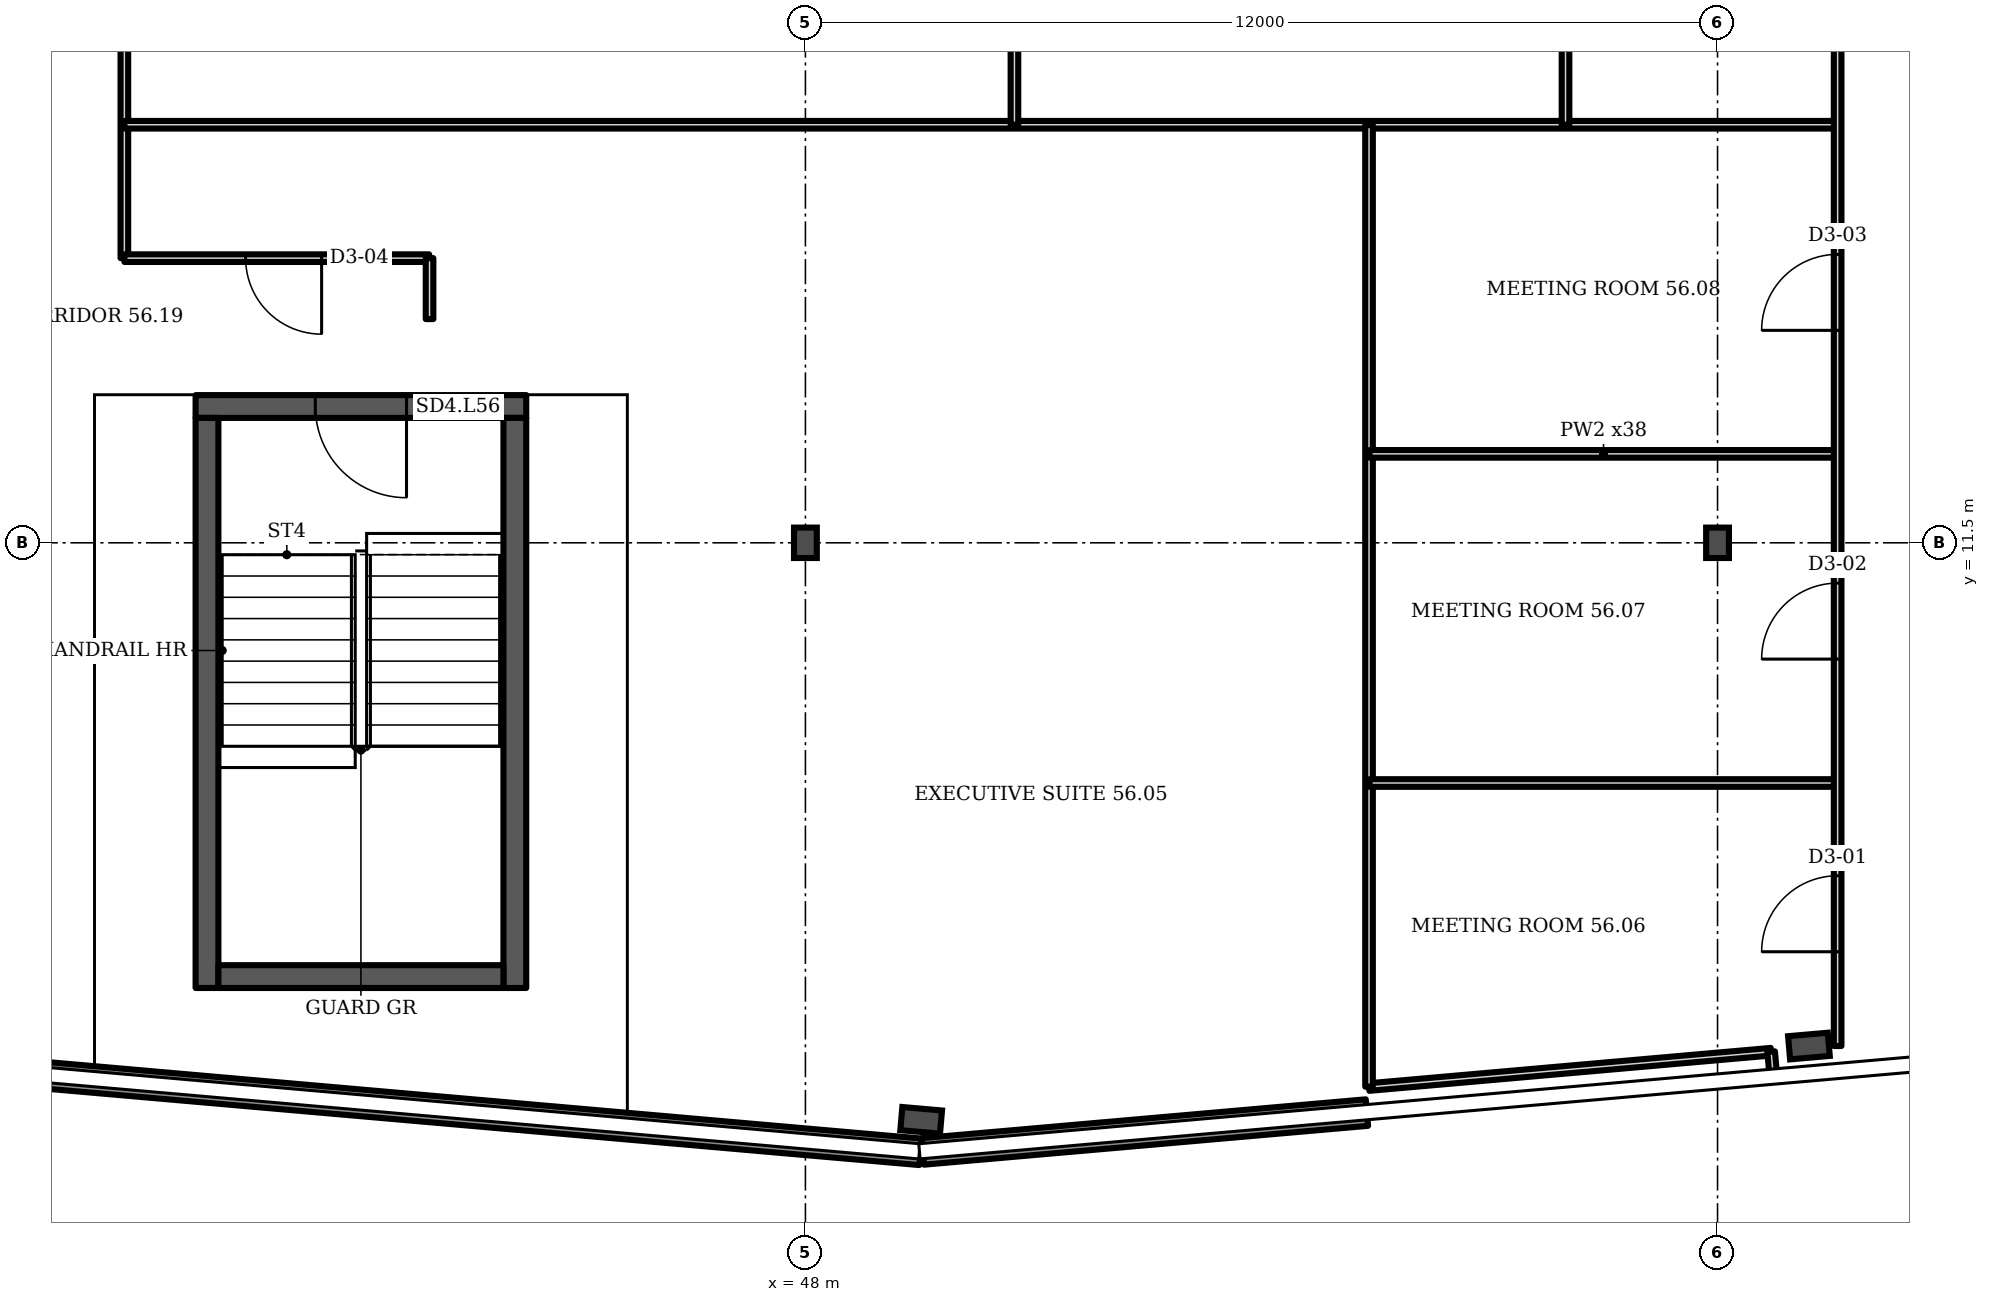
"""IFC4 building model, lengths in metres.
Left out: names, types, materials, properties, quantities, classifications, styles, units other than length and angle.
Written with IfcOpenShell. Run it as: python <this file> out.ifc"""

import sys

from ifc_helpers import new_model, si_unit, direction, frame, frame_2d, origin, origin_2d, place, context, subcontext, project, spatial, rectangle, i_section, extrude, element, fill, save


model = new_model("IFC4")
c1 = context("Model", 3, precision=1e-05, world=origin(), true_north=direction((0.0, 1.0)))
c2 = subcontext(c1, "Body", "Model", "MODEL_VIEW")
j1 = project(units=[si_unit("LENGTHUNIT", "METRE"), si_unit("PLANEANGLEUNIT", "RADIAN")], contexts=[c1])
p1 = place(None, origin())
s1 = spatial("IfcSite", under=j1, at=p1, CompositionType="ELEMENT")
p2 = place(p1, origin())
s2 = spatial("IfcBuilding", under=s1, at=p2, CompositionType="ELEMENT")
p3 = place(p2, frame((0.0, 0.0, 225.1)))
s3 = spatial("IfcBuildingStorey", under=s2, at=p3, CompositionType="ELEMENT", Elevation=225.1)
for number, where, z_axis, x_axis in (
    (1, (49.523, 3.902, 0.0), (0.0, 0.0, 1.0), (-0.087, -0.996, 0.0)),
    (2, (61.202, 4.879, 0.0), (0.0, 0.0, 1.0), (0.087, -0.996, 0.0)),
):
    element("IfcColumn", number, at=place(p3, frame(where, z_axis=z_axis, x_axis=x_axis)), inside=s3, PredefinedType="COLUMN", context=c2, shape_type="SweptSolid", body=[
        extrude(i_section(OverallWidth=0.306, OverallDepth=0.524, WebThickness=0.021, FlangeThickness=0.04, FilletRadius=0.027, at=origin_2d()), origin(), (0.0, 0.0, 1.0), 3.6),
    ])
for number, where, z_axis, x_axis in (
    (3, (48.0, 11.5, 0.0), (0.0, 0.0, 1.0), (1.0, 0.0, 0.0)),
    (4, (60.0, 11.5, 0.0), (0.0, 0.0, 1.0), (1.0, 0.0, 0.0)),
):
    element("IfcColumn", number, at=place(p3, frame(where, z_axis=z_axis, x_axis=x_axis)), inside=s3, PredefinedType="COLUMN", context=c2, shape_type="SweptSolid", body=[
        extrude(i_section(OverallWidth=0.3, OverallDepth=0.4, WebThickness=0.013, FlangeThickness=0.024, FilletRadius=0.027, at=origin_2d()), origin(), (0.0, 0.0, 1.0), 3.6),
    ])
p4 = place(p3, frame((37.729, 4.519, 0.0), z_axis=(0.0, 0.0, 1.0), x_axis=(0.99619, -0.087167, 0.0)))
e5 = element("IfcWall", 5, at=p4, inside=s3, PredefinedType="SOLIDWALL", context=c2, shape_type="SweptSolid", body=[
    extrude(rectangle(XDim=11.831, YDim=0.35, at=frame_2d((5.915, 0.0))), origin(), (0.0, 0.0, 1.0), 1.0),
])
p5 = place(p3, frame((49.545, 3.493, 0.0), z_axis=(0.0, 0.0, 1.0), x_axis=(0.996196, 0.087138, 0.0)))
e6 = element("IfcWall", 6, at=p5, inside=s3, PredefinedType="SOLIDWALL", context=c2, shape_type="SweptSolid", body=[
    extrude(rectangle(XDim=5.864, YDim=0.35, at=frame_2d((2.932, 0.0))), origin(), (0.0, 0.0, 1.0), 1.0),
])
p6 = place(p3, frame((39.977, 13.293, 0.0), z_axis=(0.0, 0.0, 1.0), x_axis=(1.0, 0.0, 0.0)))
e7 = element("IfcWall", 7, at=p6, inside=s3, PredefinedType="SHEAR", context=c2, shape_type="SweptSolid", body=[
    extrude(rectangle(XDim=4.35, YDim=0.3, at=frame_2d((2.175, 0.0))), origin(), (0.0, 0.0, 1.0), 3.2),
])
p7 = place(p6, frame((1.575, 0.0, 0.0)))
e8 = element("IfcOpeningElement", 8, at=p7, cuts=e7, PredefinedType="OPENING", context=c2, shape_type="SweptSolid", body=[
    extrude(rectangle(XDim=1.2, YDim=2.1, at=frame_2d((0.6, 1.05))), frame((0.0, 0.16, 0.0), z_axis=(0.0, -1.0, 0.0), x_axis=(1.0, 0.0, 0.0)), (0.0, 0.0, 1.0), 0.32),
])
p8 = place(p3, frame((39.04, 15.245, 0.0), z_axis=(0.0, 0.0, 1.0), x_axis=(0.0, 1.0, 0.0)))
e9 = element("IfcWall", 9, at=p8, inside=s3, PredefinedType="PARTITIONING", context=c2, shape_type="SweptSolid", body=[
    extrude(rectangle(XDim=15.255, YDim=0.1, at=frame_2d((7.627, 0.0))), origin(), (0.0, 0.0, 1.0), 3.2),
])
p9 = place(p8, frame((3.575, 0.0, 0.0)))
e10 = element("IfcOpeningElement", 10, at=p9, cuts=e9, PredefinedType="OPENING", context=c2, shape_type="SweptSolid", body=[
    extrude(rectangle(XDim=1.0, YDim=2.1, at=frame_2d((0.5, 1.05))), frame((0.0, 0.06, 0.0), z_axis=(0.0, -1.0, 0.0), x_axis=(1.0, 0.0, 0.0)), (0.0, 0.0, 1.0), 0.12),
])
p10 = place(p8, frame((8.075, 0.0, 0.0)))
e11 = element("IfcOpeningElement", 11, at=p10, cuts=e9, PredefinedType="OPENING", context=c2, shape_type="SweptSolid", body=[
    extrude(rectangle(XDim=1.0, YDim=2.1, at=frame_2d((0.5, 1.05))), frame((0.0, 0.06, 0.0), z_axis=(0.0, -1.0, 0.0), x_axis=(1.0, 0.0, 0.0)), (0.0, 0.0, 1.0), 0.12),
])
p11 = place(p3, frame((39.04, 15.245, 0.0), z_axis=(0.0, 0.0, 1.0), x_axis=(1.0, 0.0, 0.0)))
e12 = element("IfcWall", 12, at=p11, inside=s3, PredefinedType="PARTITIONING", context=c2, shape_type="SweptSolid", body=[
    extrude(rectangle(XDim=4.01, YDim=0.1, at=frame_2d((2.005, 0.0))), origin(), (0.0, 0.0, 1.0), 3.2),
])
p12 = place(p11, frame((1.595, 0.0, 0.0)))
e13 = element("IfcOpeningElement", 13, at=p12, cuts=e12, PredefinedType="OPENING", context=c2, shape_type="SweptSolid", body=[
    extrude(rectangle(XDim=1.0, YDim=2.1, at=frame_2d((0.5, 1.05))), frame((0.0, 0.06, 0.0), z_axis=(0.0, -1.0, 0.0), x_axis=(1.0, 0.0, 0.0)), (0.0, 0.0, 1.0), 0.12),
])
p13 = place(p3, frame((39.04, 17.0, 0.0), z_axis=(0.0, 0.0, 1.0), x_axis=(1.0, 0.0, 0.0)))
e14 = element("IfcWall", 14, at=p13, inside=s3, PredefinedType="PARTITIONING", context=c2, shape_type="SweptSolid", body=[
    extrude(rectangle(XDim=22.54, YDim=0.1, at=frame_2d((11.27, 0.0))), origin(), (0.0, 0.0, 1.0), 3.2),
])
p14 = place(p3, frame((43.055, 14.443, 0.0), z_axis=(0.0, 0.0, 1.0), x_axis=(0.0, 1.0, 0.0)))
e15 = element("IfcWall", 15, at=p14, inside=s3, PredefinedType="PARTITIONING", context=c2, shape_type="SweptSolid", body=[
    extrude(rectangle(XDim=0.802, YDim=0.1, at=frame_2d((0.401, 0.0))), origin(), (0.0, 0.0, 1.0), 3.2),
])
p15 = place(p3, frame((50.75, 17.0, 0.0), z_axis=(0.0, 0.0, 1.0), x_axis=(0.0, 1.0, 0.0)))
e16 = element("IfcWall", 16, at=p15, inside=s3, PredefinedType="PARTITIONING", context=c2, shape_type="SweptSolid", body=[
    extrude(rectangle(XDim=9.0, YDim=0.1, at=frame_2d((4.5, 0.0))), origin(), (0.0, 0.0, 1.0), 3.2),
])
p16 = place(p3, frame((55.415, 4.34, 0.0), z_axis=(0.0, 0.0, 1.0), x_axis=(0.996159, 0.087534, 0.0)))
e17 = element("IfcWall", 17, at=p16, inside=s3, PredefinedType="PARTITIONING", context=c2, shape_type="SweptSolid", body=[
    extrude(rectangle(XDim=5.31, YDim=0.1, at=frame_2d((2.655, 0.0))), origin(), (0.0, 0.0, 1.0), 2.58),
])
p17 = place(p3, frame((55.415, 4.345, 0.0), z_axis=(0.0, 0.0, 1.0), x_axis=(0.0, 1.0, 0.0)))
e18 = element("IfcWall", 18, at=p17, inside=s3, PredefinedType="PARTITIONING", context=c2, shape_type="SweptSolid", body=[
    extrude(rectangle(XDim=12.65, YDim=0.1, at=frame_2d((6.325, 0.0))), origin(), (0.0, 0.0, 1.0), 3.2),
])
for number, where, z_axis, x_axis in (
    (19, (55.42, 8.34, 0.0), (0.0, 0.0, 1.0), (1.0, 0.0, 0.0)),
    (20, (55.42, 12.67, 0.0), (0.0, 0.0, 1.0), (1.0, 0.0, 0.0)),
):
    element("IfcWall", number, at=place(p3, frame(where, z_axis=z_axis, x_axis=x_axis)), inside=s3, PredefinedType="PARTITIONING", context=c2, shape_type="SweptSolid", body=[
        extrude(rectangle(XDim=6.16, YDim=0.1, at=frame_2d((3.08, 0.0))), origin(), (0.0, 0.0, 1.0), 3.2),
    ])
p18 = place(p3, frame((58.0, 17.0, 0.0), z_axis=(0.0, 0.0, 1.0), x_axis=(0.0, 1.0, 0.0)))
e21 = element("IfcWall", 21, at=p18, inside=s3, PredefinedType="PARTITIONING", context=c2, shape_type="SweptSolid", body=[
    extrude(rectangle(XDim=13.5, YDim=0.1, at=frame_2d((6.75, 0.0))), origin(), (0.0, 0.0, 1.0), 3.2),
])
p19 = place(p3, frame((60.733, 4.497, 0.0), z_axis=(0.0, 0.0, 1.0), x_axis=(-0.090037, 0.995936, 0.0)))
e22 = element("IfcWall", 22, at=p19, inside=s3, PredefinedType="PARTITIONING", context=c2, shape_type="SweptSolid", body=[
    extrude(rectangle(XDim=0.309, YDim=0.1, at=frame_2d((0.155, 0.0))), origin(), (0.0, 0.0, 1.0), 3.2),
])
p20 = place(p3, frame((61.58, 4.88, 0.0), z_axis=(0.0, 0.0, 1.0), x_axis=(0.0, 1.0, 0.0)))
e23 = element("IfcWall", 23, at=p20, inside=s3, PredefinedType="PARTITIONING", context=c2, shape_type="SweptSolid", body=[
    extrude(rectangle(XDim=24.82, YDim=0.1, at=frame_2d((12.41, 0.0))), origin(), (0.0, 0.0, 1.0), 3.2),
])
p21 = place(p20, frame((1.24, 0.0, 0.0)))
e24 = element("IfcOpeningElement", 24, at=p21, cuts=e23, PredefinedType="OPENING", context=c2, shape_type="SweptSolid", body=[
    extrude(rectangle(XDim=1.0, YDim=2.1, at=frame_2d((0.5, 1.05))), frame((0.0, 0.06, 0.0), z_axis=(0.0, -1.0, 0.0), x_axis=(1.0, 0.0, 0.0)), (0.0, 0.0, 1.0), 0.12),
])
p22 = place(p20, frame((5.09, 0.0, 0.0)))
e25 = element("IfcOpeningElement", 25, at=p22, cuts=e23, PredefinedType="OPENING", context=c2, shape_type="SweptSolid", body=[
    extrude(rectangle(XDim=1.0, YDim=2.1, at=frame_2d((0.5, 1.05))), frame((0.0, 0.06, 0.0), z_axis=(0.0, -1.0, 0.0), x_axis=(1.0, 0.0, 0.0)), (0.0, 0.0, 1.0), 0.12),
])
p23 = place(p20, frame((9.415, 0.0, 0.0)))
e26 = element("IfcOpeningElement", 26, at=p23, cuts=e23, PredefinedType="OPENING", context=c2, shape_type="SweptSolid", body=[
    extrude(rectangle(XDim=1.0, YDim=2.1, at=frame_2d((0.5, 1.05))), frame((0.0, 0.06, 0.0), z_axis=(0.0, -1.0, 0.0), x_axis=(1.0, 0.0, 0.0)), (0.0, 0.0, 1.0), 0.12),
])
p24 = place(p20, frame((14.85, 0.0, 0.0)))
e27 = element("IfcOpeningElement", 27, at=p24, cuts=e23, PredefinedType="OPENING", context=c2, shape_type="SweptSolid", body=[
    extrude(rectangle(XDim=1.0, YDim=2.1, at=frame_2d((0.5, 1.05))), frame((0.0, 0.06, 0.0), z_axis=(0.0, -1.0, 0.0), x_axis=(1.0, 0.0, 0.0)), (0.0, 0.0, 1.0), 0.12),
])
p25 = place(p20, frame((22.63, 0.0, 0.0)))
e28 = element("IfcOpeningElement", 28, at=p25, cuts=e23, PredefinedType="OPENING", context=c2, shape_type="SweptSolid", body=[
    extrude(rectangle(XDim=1.0, YDim=2.1, at=frame_2d((0.5, 1.05))), frame((0.0, 0.06, 0.0), z_axis=(0.0, -1.0, 0.0), x_axis=(1.0, 0.0, 0.0)), (0.0, 0.0, 1.0), 0.12),
])
for number, where, z_axis, x_axis in (
    (29, (40.127, 5.643, 0.0), (0.0, 0.0, 1.0), (0.0, 1.0, 0.0)),
    (30, (44.177, 5.643, 0.0), (0.0, 0.0, 1.0), (0.0, 1.0, 0.0)),
):
    element("IfcWall", number, at=place(p3, frame(where, z_axis=z_axis, x_axis=x_axis)), inside=s3, PredefinedType="SHEAR", context=c2, shape_type="SweptSolid", body=[
        extrude(rectangle(XDim=7.5, YDim=0.3, at=frame_2d((3.75, 0.0))), origin(), (0.0, 0.0, 1.0), 3.2),
    ])
p26 = place(p3, frame((40.277, 5.793, 0.0), z_axis=(0.0, 0.0, 1.0), x_axis=(1.0, 0.0, 0.0)))
e31 = element("IfcWall", 31, at=p26, inside=s3, PredefinedType="SHEAR", context=c2, shape_type="SweptSolid", body=[
    extrude(rectangle(XDim=3.75, YDim=0.3, at=frame_2d((1.875, 0.0))), origin(), (0.0, 0.0, 1.0), 3.2),
])
p27 = place(p7, origin())
e32 = element("IfcDoor", 32, at=p27, inside=s3, OperationType="SINGLE_SWING_RIGHT", PredefinedType="DOOR", context=c2, shape_type="SweptSolid", body=[
    extrude(rectangle(XDim=1.2, YDim=2.1, at=frame_2d((0.6, 1.05))), frame((0.0, 0.025, 0.0), z_axis=(0.0, -1.0, 0.0), x_axis=(1.0, 0.0, 0.0)), (0.0, 0.0, 1.0), 0.05),
])
fill(e8, e32)
p28 = place(p21, origin())
e33 = element("IfcDoor", 33, at=p28, inside=s3, OperationType="SINGLE_SWING_LEFT", PredefinedType="DOOR", context=c2, shape_type="SweptSolid", body=[
    extrude(rectangle(XDim=1.0, YDim=2.1, at=frame_2d((0.5, 1.05))), frame((0.0, 0.025, 0.0), z_axis=(0.0, -1.0, 0.0), x_axis=(1.0, 0.0, 0.0)), (0.0, 0.0, 1.0), 0.05),
])
fill(e24, e33)
p29 = place(p22, origin())
e34 = element("IfcDoor", 34, at=p29, inside=s3, OperationType="SINGLE_SWING_LEFT", PredefinedType="DOOR", context=c2, shape_type="SweptSolid", body=[
    extrude(rectangle(XDim=1.0, YDim=2.1, at=frame_2d((0.5, 1.05))), frame((0.0, 0.025, 0.0), z_axis=(0.0, -1.0, 0.0), x_axis=(1.0, 0.0, 0.0)), (0.0, 0.0, 1.0), 0.05),
])
fill(e25, e34)
p30 = place(p23, origin())
e35 = element("IfcDoor", 35, at=p30, inside=s3, OperationType="SINGLE_SWING_LEFT", PredefinedType="DOOR", context=c2, shape_type="SweptSolid", body=[
    extrude(rectangle(XDim=1.0, YDim=2.1, at=frame_2d((0.5, 1.05))), frame((0.0, 0.025, 0.0), z_axis=(0.0, -1.0, 0.0), x_axis=(1.0, 0.0, 0.0)), (0.0, 0.0, 1.0), 0.05),
])
fill(e26, e35)
p31 = place(p12, origin())
e36 = element("IfcDoor", 36, at=p31, inside=s3, OperationType="SINGLE_SWING_RIGHT", PredefinedType="DOOR", context=c2, shape_type="SweptSolid", body=[
    extrude(rectangle(XDim=1.0, YDim=2.1, at=frame_2d((0.5, 1.05))), frame((0.0, 0.025, 0.0), z_axis=(0.0, -1.0, 0.0), x_axis=(1.0, 0.0, 0.0)), (0.0, 0.0, 1.0), 0.05),
])
fill(e13, e36)
save(model, sys.argv[1])
